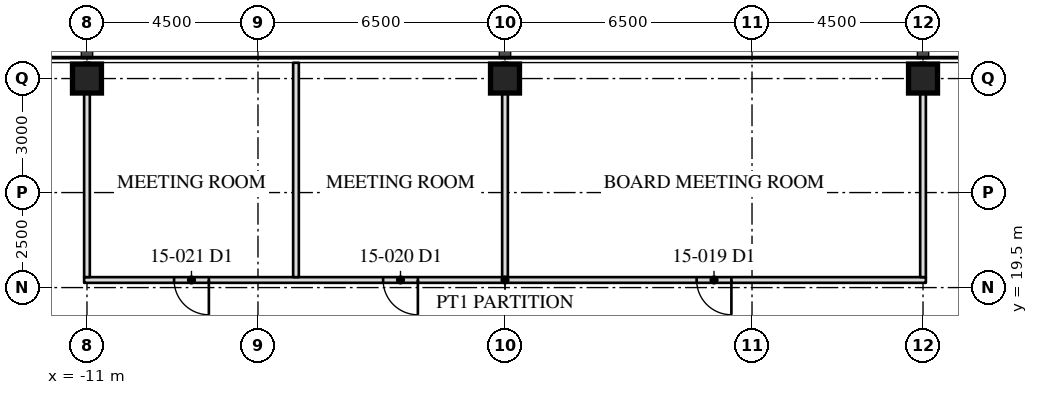
"""IFC4 building model, lengths in metres.
Left out: names, types, materials, properties, quantities, classifications, styles, units other than length and angle.
Written with IfcOpenShell. Run it as: python <this file> out.ifc"""

import sys

from ifc_helpers import new_model, si_unit, direction, frame, frame_2d, origin, origin_2d, place, context, subcontext, project, spatial, rectangle, hollow_rectangle, extrude, element, fill, save


model = new_model("IFC4")
c1 = context("Model", 3, precision=1e-05, world=origin(), true_north=direction((0.0, 1.0)))
c2 = subcontext(c1, "Body", "Model", "MODEL_VIEW")
j1 = project(units=[si_unit("LENGTHUNIT", "METRE"), si_unit("PLANEANGLEUNIT", "RADIAN")], contexts=[c1])
p1 = place(None, origin())
s1 = spatial("IfcSite", under=j1, at=p1, CompositionType="ELEMENT")
p2 = place(p1, origin())
s2 = spatial("IfcBuilding", under=s1, at=p2, CompositionType="ELEMENT")
p3 = place(p2, frame((0.0, 0.0, 65.2)))
s3 = spatial("IfcBuildingStorey", under=s2, at=p3, CompositionType="ELEMENT", Elevation=65.2)
for number, where, z_axis, x_axis in (
    (1, (11.0, 25.0, 0.0), (0.0, 0.0, 1.0), (1.0, 0.0, 0.0)),
    (2, (0.0, 25.0, 0.0), (0.0, 0.0, 1.0), (1.0, 0.0, 0.0)),
    (3, (-11.0, 25.0, 0.0), (0.0, 0.0, 1.0), (1.0, 0.0, 0.0)),
):
    element("IfcColumn", number, at=place(p3, frame(where, z_axis=z_axis, x_axis=x_axis)), inside=s3, PredefinedType="COLUMN", context=c2, shape_type="SweptSolid", body=[
        extrude(hollow_rectangle(XDim=0.762, YDim=0.762, WallThickness=0.127, at=origin_2d()), origin(), (0.0, 0.0, 1.0), 4.1),
    ])
p4 = place(p3, frame((11.075, 19.7, 0.0), z_axis=(0.0, 0.0, 1.0), x_axis=(-1.0, 0.0, 0.0)))
e4 = element("IfcWall", 4, at=p4, inside=s3, PredefinedType="PARTITIONING", context=c2, shape_type="SweptSolid", body=[
    extrude(rectangle(XDim=22.15, YDim=0.15, at=frame_2d((11.075, 0.0))), origin(), (0.0, 0.0, 1.0), 3.91),
])
p5 = place(p4, frame((5.117, 0.0, 0.0)))
e5 = element("IfcOpeningElement", 5, at=p5, cuts=e4, PredefinedType="OPENING", context=c2, shape_type="SweptSolid", body=[
    extrude(rectangle(XDim=0.915, YDim=2.134, at=frame_2d((0.458, 1.067))), frame((0.0, 0.085, 0.0), z_axis=(0.0, -1.0, 0.0), x_axis=(1.0, 0.0, 0.0)), (0.0, 0.0, 1.0), 0.17),
])
p6 = place(p4, frame((13.367, 0.0, 0.0)))
e6 = element("IfcOpeningElement", 6, at=p6, cuts=e4, PredefinedType="OPENING", context=c2, shape_type="SweptSolid", body=[
    extrude(rectangle(XDim=0.915, YDim=2.134, at=frame_2d((0.458, 1.067))), frame((0.0, 0.085, 0.0), z_axis=(0.0, -1.0, 0.0), x_axis=(1.0, 0.0, 0.0)), (0.0, 0.0, 1.0), 0.17),
])
p7 = place(p4, frame((18.867, 0.0, 0.0)))
e7 = element("IfcOpeningElement", 7, at=p7, cuts=e4, PredefinedType="OPENING", context=c2, shape_type="SweptSolid", body=[
    extrude(rectangle(XDim=0.915, YDim=2.134, at=frame_2d((0.458, 1.067))), frame((0.0, 0.085, 0.0), z_axis=(0.0, -1.0, 0.0), x_axis=(1.0, 0.0, 0.0)), (0.0, 0.0, 1.0), 0.17),
])
for number, where, z_axis, x_axis in (
    (8, (11.0, 19.775, 0.0), (0.0, 0.0, 1.0), (0.0, 1.0, 0.0)),
    (9, (0.0, 19.775, 0.0), (0.0, 0.0, 1.0), (0.0, 1.0, 0.0)),
):
    element("IfcWall", number, at=place(p3, frame(where, z_axis=z_axis, x_axis=x_axis)), inside=s3, PredefinedType="PARTITIONING", context=c2, shape_type="SweptSolid", body=[
        extrude(rectangle(XDim=5.64, YDim=0.15, at=frame_2d((2.82, 0.0))), origin(), (0.0, 0.0, 1.0), 3.13),
    ])
p8 = place(p3, frame((-5.5, 19.775, 0.0), z_axis=(0.0, 0.0, 1.0), x_axis=(0.0, 1.0, 0.0)))
e10 = element("IfcWall", 10, at=p8, inside=s3, PredefinedType="PARTITIONING", context=c2, shape_type="SweptSolid", body=[
    extrude(rectangle(XDim=5.64, YDim=0.15, at=frame_2d((2.82, 0.0))), origin(), (0.0, 0.0, 1.0), 3.91),
])
p9 = place(p3, frame((-11.0, 19.775, 0.0), z_axis=(0.0, 0.0, 1.0), x_axis=(0.0, 1.0, 0.0)))
e11 = element("IfcWall", 11, at=p9, inside=s3, PredefinedType="PARTITIONING", context=c2, shape_type="SweptSolid", body=[
    extrude(rectangle(XDim=5.64, YDim=0.15, at=frame_2d((2.82, 0.0))), origin(), (0.0, 0.0, 1.0), 3.13),
])
p10 = place(p5, origin())
e12 = element("IfcDoor", 12, at=p10, inside=s3, OperationType="SINGLE_SWING_LEFT", PredefinedType="DOOR", context=c2, shape_type="SweptSolid", body=[
    extrude(rectangle(XDim=0.915, YDim=2.134, at=frame_2d((0.458, 1.067))), frame((0.0, 0.025, 0.0), z_axis=(0.0, -1.0, 0.0), x_axis=(1.0, 0.0, 0.0)), (0.0, 0.0, 1.0), 0.05),
])
fill(e5, e12)
p11 = place(p6, origin())
e13 = element("IfcDoor", 13, at=p11, inside=s3, OperationType="SINGLE_SWING_LEFT", PredefinedType="DOOR", context=c2, shape_type="SweptSolid", body=[
    extrude(rectangle(XDim=0.915, YDim=2.134, at=frame_2d((0.458, 1.067))), frame((0.0, 0.025, 0.0), z_axis=(0.0, -1.0, 0.0), x_axis=(1.0, 0.0, 0.0)), (0.0, 0.0, 1.0), 0.05),
])
fill(e6, e13)
p12 = place(p7, origin())
e14 = element("IfcDoor", 14, at=p12, inside=s3, OperationType="SINGLE_SWING_LEFT", PredefinedType="DOOR", context=c2, shape_type="SweptSolid", body=[
    extrude(rectangle(XDim=0.915, YDim=2.134, at=frame_2d((0.458, 1.067))), frame((0.0, 0.025, 0.0), z_axis=(0.0, -1.0, 0.0), x_axis=(1.0, 0.0, 0.0)), (0.0, 0.0, 1.0), 0.05),
])
fill(e7, e14)
save(model, sys.argv[1])
